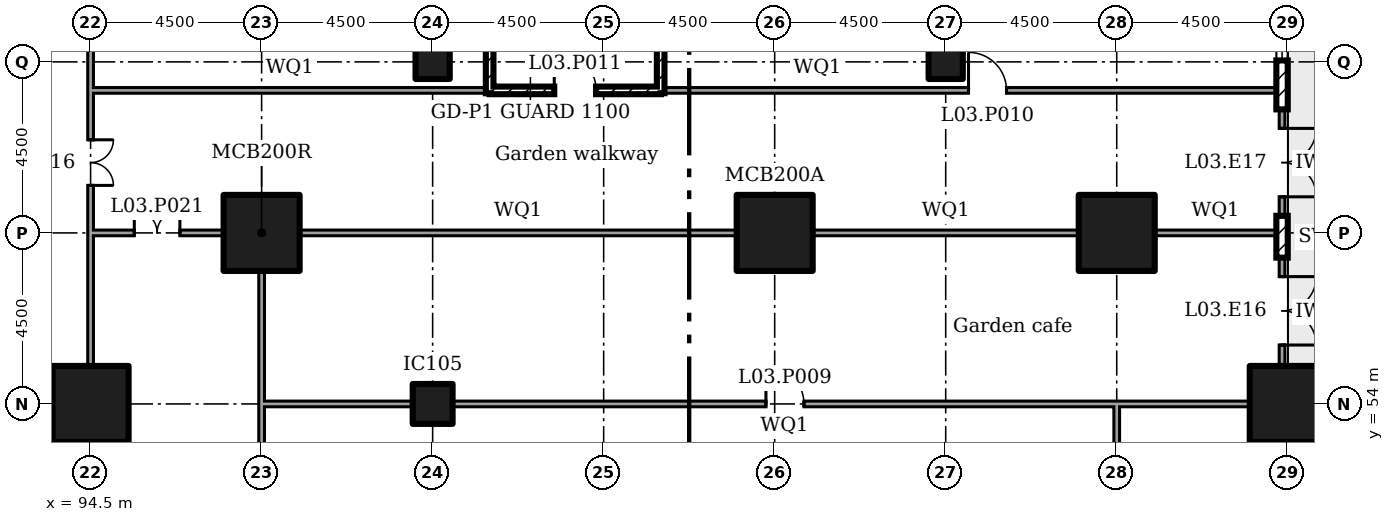
"""IFC4 building model, lengths in metres.
Left out: names, types, materials, properties, quantities, classifications, styles, units other than length and angle.
Written with IfcOpenShell. Run it as: python <this file> out.ifc"""

import sys

from ifc_helpers import new_model, si_unit, direction, frame, frame_2d, origin, origin_2d, place, context, subcontext, project, spatial, rectangle, extrude, element, fill, save


model = new_model("IFC4")
c1 = context("Model", 3, precision=1e-05, world=origin(), true_north=direction((0.0, 1.0)))
c2 = subcontext(c1, "Body", "Model", "MODEL_VIEW")
j1 = project(units=[si_unit("LENGTHUNIT", "METRE"), si_unit("PLANEANGLEUNIT", "RADIAN")], contexts=[c1])
p1 = place(None, origin())
s1 = spatial("IfcSite", under=j1, at=p1, CompositionType="ELEMENT")
p2 = place(p1, origin())
s2 = spatial("IfcBuilding", under=s1, at=p2, CompositionType="ELEMENT")
p3 = place(p2, frame((0.0, 0.0, 16.5)))
s3 = spatial("IfcBuildingStorey", under=s2, at=p3, CompositionType="ELEMENT", Elevation=16.5)
for number, where in (
    (1, (94.5, 54.0, 0.0)),
    (2, (99.0, 58.5, 0.0)),
    (3, (112.5, 58.5, 0.0)),
    (4, (121.5, 58.5, 0.0)),
    (5, (126.0, 54.0, 0.0)),
):
    element("IfcColumn", number, at=place(p3, frame(where)), inside=s3, PredefinedType="COLUMN", context=c2, shape_type="SweptSolid", body=[
        extrude(rectangle(XDim=2.0, YDim=2.0, at=origin_2d()), origin(), (0.0, 0.0, 1.0), 4.5),
    ])
p4 = place(p3, frame((103.5, 54.0, 0.0)))
e6 = element("IfcColumn", 6, at=p4, inside=s3, PredefinedType="COLUMN", context=c2, shape_type="SweptSolid", body=[
    extrude(rectangle(XDim=1.05, YDim=1.05, at=origin_2d()), origin(), (0.0, 0.0, 1.0), 4.5),
])
for number, where in (
    (7, (103.5, 63.0, 0.0)),
    (8, (117.0, 63.0, 0.0)),
):
    element("IfcColumn", number, at=place(p3, frame(where)), inside=s3, PredefinedType="COLUMN", context=c2, shape_type="SweptSolid", body=[
        extrude(rectangle(XDim=0.9, YDim=0.9, at=origin_2d()), origin(), (0.0, 0.0, 1.0), 4.5),
    ])
p5 = place(p3, frame((125.85, 55.0, 0.0), z_axis=(0.0, 0.0, 1.0), x_axis=(0.0, 1.0, 0.0)))
e9 = element("IfcWall", 9, at=p5, inside=s3, PredefinedType="SOLIDWALL", context=c2, shape_type="SweptSolid", body=[
    extrude(rectangle(XDim=2.85, YDim=0.15, at=frame_2d((1.425, 0.0))), origin(), (0.0, 0.0, 1.0), 4.05),
])
p6 = place(p5, frame((0.55, 0.0, 0.0)))
e10 = element("IfcOpeningElement", 10, at=p6, cuts=e9, PredefinedType="OPENING", context=c2, shape_type="SweptSolid", body=[
    extrude(rectangle(XDim=1.8, YDim=2.4, at=frame_2d((0.9, 1.2))), frame((0.0, 0.085, 0.0), z_axis=(0.0, -1.0, 0.0), x_axis=(1.0, 0.0, 0.0)), (0.0, 0.0, 1.0), 0.17),
])
p7 = place(p3, frame((125.85, 57.85, 0.0), z_axis=(0.0, 0.0, 1.0), x_axis=(0.0, 1.0, 0.0)))
e11 = element("IfcWall", 11, at=p7, inside=s3, PredefinedType="ELEMENTEDWALL", context=c2, shape_type="SweptSolid", body=[
    extrude(rectangle(XDim=1.1, YDim=0.3, at=frame_2d((0.55, 0.0))), origin(), (0.0, 0.0, 1.0), 4.05),
])
p8 = place(p3, frame((125.85, 58.95, 0.0), z_axis=(0.0, 0.0, 1.0), x_axis=(0.0, 1.0, 0.0)))
e12 = element("IfcWall", 12, at=p8, inside=s3, PredefinedType="SOLIDWALL", context=c2, shape_type="SweptSolid", body=[
    extrude(rectangle(XDim=2.8, YDim=0.15, at=frame_2d((1.4, 0.0))), origin(), (0.0, 0.0, 1.0), 4.05),
])
p9 = place(p8, frame((0.5, 0.0, 0.0)))
e13 = element("IfcOpeningElement", 13, at=p9, cuts=e12, PredefinedType="OPENING", context=c2, shape_type="SweptSolid", body=[
    extrude(rectangle(XDim=1.8, YDim=2.4, at=frame_2d((0.9, 1.2))), frame((0.0, 0.085, 0.0), z_axis=(0.0, -1.0, 0.0), x_axis=(1.0, 0.0, 0.0)), (0.0, 0.0, 1.0), 0.17),
])
p10 = place(p3, frame((125.85, 61.75, 0.0), z_axis=(0.0, 0.0, 1.0), x_axis=(0.0, 1.0, 0.0)))
e14 = element("IfcWall", 14, at=p10, inside=s3, PredefinedType="ELEMENTEDWALL", context=c2, shape_type="SweptSolid", body=[
    extrude(rectangle(XDim=4.975, YDim=0.3, at=frame_2d((2.488, 0.0))), origin(), (0.0, 0.0, 1.0), 4.05),
])
p11 = place(p10, frame((1.288, 0.0, 0.45)))
e15 = element("IfcOpeningElement", 15, at=p11, cuts=e14, PredefinedType="OPENING", context=c2, shape_type="SweptSolid", body=[
    extrude(rectangle(XDim=2.4, YDim=2.4, at=frame_2d((1.2, 1.2))), frame((0.0, 0.16, 0.0), z_axis=(0.0, -1.0, 0.0), x_axis=(1.0, 0.0, 0.0)), (0.0, 0.0, 1.0), 0.32),
])
p12 = place(p3, frame((94.5, 45.995, 0.0), z_axis=(0.0, 0.0, 1.0), x_axis=(0.0, 1.0, 0.0)))
e16 = element("IfcWall", 16, at=p12, inside=s3, PredefinedType="PARTITIONING", context=c2, shape_type="SweptSolid", body=[
    extrude(rectangle(XDim=7.01, YDim=0.15, at=frame_2d((3.505, 0.0))), origin(), (0.0, 0.0, 1.0), 2.25),
])
p13 = place(p12, frame((2.6, 0.0, 0.0)))
e17 = element("IfcOpeningElement", 17, at=p13, cuts=e16, PredefinedType="OPENING", context=c2, shape_type="SweptSolid", body=[
    extrude(rectangle(XDim=1.8, YDim=2.1, at=frame_2d((0.9, 1.05))), frame((0.0, 0.085, 0.0), z_axis=(0.0, -1.0, 0.0), x_axis=(1.0, 0.0, 0.0)), (0.0, 0.0, 1.0), 0.17),
])
p14 = place(p3, frame((94.5, 54.995, 0.0), z_axis=(0.0, 0.0, 1.0), x_axis=(0.0, 1.0, 0.0)))
e18 = element("IfcWall", 18, at=p14, inside=s3, PredefinedType="PARTITIONING", context=c2, shape_type="SweptSolid", body=[
    extrude(rectangle(XDim=3.58, YDim=0.15, at=frame_2d((1.79, 0.0))), origin(), (0.0, 0.0, 1.0), 4.05),
])
p15 = place(p3, frame((94.5, 58.5, 0.0), z_axis=(0.0, 0.0, 1.0), x_axis=(0.0, 1.0, 0.0)))
e19 = element("IfcWall", 19, at=p15, inside=s3, PredefinedType="PARTITIONING", context=c2, shape_type="SweptSolid", body=[
    extrude(rectangle(XDim=3.825, YDim=0.15, at=frame_2d((1.913, 0.0))), origin(), (0.0, 0.0, 1.0), 4.05),
])
p16 = place(p15, frame((1.25, 0.0, 0.0)))
e20 = element("IfcOpeningElement", 20, at=p16, cuts=e19, PredefinedType="OPENING", context=c2, shape_type="SweptSolid", body=[
    extrude(rectangle(XDim=1.2, YDim=2.1, at=frame_2d((0.6, 1.05))), frame((0.0, 0.085, 0.0), z_axis=(0.0, -1.0, 0.0), x_axis=(1.0, 0.0, 0.0)), (0.0, 0.0, 1.0), 0.17),
])
p17 = place(p3, frame((94.5, 62.25, 0.0), z_axis=(0.0, 0.0, 1.0), x_axis=(0.0, 1.0, 0.0)))
e21 = element("IfcWall", 21, at=p17, inside=s3, PredefinedType="PARTITIONING", context=c2, shape_type="SweptSolid", body=[
    extrude(rectangle(XDim=9.45, YDim=0.15, at=frame_2d((4.725, 0.0))), origin(), (0.0, 0.0, 1.0), 4.05),
])
p18 = place(p3, frame((99.0, 36.52, 0.0), z_axis=(0.0, 0.0, 1.0), x_axis=(0.0, 1.0, 0.0)))
e22 = element("IfcWall", 22, at=p18, inside=s3, PredefinedType="PARTITIONING", context=c2, shape_type="SweptSolid", body=[
    extrude(rectangle(XDim=17.555, YDim=0.15, at=frame_2d((8.777, 0.0))), origin(), (0.0, 0.0, 1.0), 4.05),
])
p19 = place(p18, frame((7.85, 0.0, 0.0)))
e23 = element("IfcOpeningElement", 23, at=p19, cuts=e22, PredefinedType="OPENING", context=c2, shape_type="SweptSolid", body=[
    extrude(rectangle(XDim=1.8, YDim=2.1, at=frame_2d((0.9, 1.05))), frame((0.0, 0.085, 0.0), z_axis=(0.0, -1.0, 0.0), x_axis=(1.0, 0.0, 0.0)), (0.0, 0.0, 1.0), 0.17),
])
p20 = place(p3, frame((99.0, 54.0, 0.0), z_axis=(0.0, 0.0, 1.0), x_axis=(0.0, 1.0, 0.0)))
e24 = element("IfcWall", 24, at=p20, inside=s3, PredefinedType="PARTITIONING", context=c2, shape_type="SweptSolid", body=[
    extrude(rectangle(XDim=3.505, YDim=0.15, at=frame_2d((1.752, 0.0))), origin(), (0.0, 0.0, 1.0), 4.05),
])
p21 = place(p3, frame((94.575, 58.5, 0.0)))
e25 = element("IfcWall", 25, at=p21, inside=s3, PredefinedType="PARTITIONING", context=c2, shape_type="SweptSolid", body=[
    extrude(rectangle(XDim=3.43, YDim=0.15, at=frame_2d((1.715, 0.0))), origin(), (0.0, 0.0, 1.0), 4.05),
])
p22 = place(p21, frame((1.075, 0.0, 0.0)))
e26 = element("IfcOpeningElement", 26, at=p22, cuts=e25, PredefinedType="OPENING", context=c2, shape_type="SweptSolid", body=[
    extrude(rectangle(XDim=1.2, YDim=2.1, at=frame_2d((0.6, 1.05))), frame((0.0, 0.085, 0.0), z_axis=(0.0, -1.0, 0.0), x_axis=(1.0, 0.0, 0.0)), (0.0, 0.0, 1.0), 0.17),
])
p23 = place(p3, frame((121.5, 50.02, 0.0), z_axis=(0.0, 0.0, 1.0), x_axis=(0.0, 1.0, 0.0)))
e27 = element("IfcWall", 27, at=p23, inside=s3, PredefinedType="PARTITIONING", context=c2, shape_type="SweptSolid", body=[
    extrude(rectangle(XDim=4.055, YDim=0.15, at=frame_2d((2.027, 0.0))), origin(), (0.0, 0.0, 1.0), 4.05),
])
p24 = place(p3, frame((99.075, 54.0, 0.0)))
e28 = element("IfcWall", 28, at=p24, inside=s3, PredefinedType="PARTITIONING", context=c2, shape_type="SweptSolid", body=[
    extrude(rectangle(XDim=3.905, YDim=0.15, at=frame_2d((1.953, 0.0))), origin(), (0.0, 0.0, 1.0), 4.05),
])
p25 = place(p3, frame((104.02, 54.0, 0.0)))
e29 = element("IfcWall", 29, at=p25, inside=s3, PredefinedType="PARTITIONING", context=c2, shape_type="SweptSolid", body=[
    extrude(rectangle(XDim=17.48, YDim=0.15, at=frame_2d((8.74, 0.0))), origin(), (0.0, 0.0, 1.0), 4.05),
])
p26 = place(p25, frame((8.25, 0.0, 0.0)))
e30 = element("IfcOpeningElement", 30, at=p26, cuts=e29, PredefinedType="OPENING", context=c2, shape_type="SweptSolid", body=[
    extrude(rectangle(XDim=1.0, YDim=2.1, at=frame_2d((0.5, 1.05))), frame((0.0, 0.085, 0.0), z_axis=(0.0, -1.0, 0.0), x_axis=(1.0, 0.0, 0.0)), (0.0, 0.0, 1.0), 0.17),
])
p27 = place(p3, frame((121.575, 54.0, 0.0)))
e31 = element("IfcWall", 31, at=p27, inside=s3, PredefinedType="PARTITIONING", context=c2, shape_type="SweptSolid", body=[
    extrude(rectangle(XDim=3.43, YDim=0.15, at=frame_2d((1.715, 0.0))), origin(), (0.0, 0.0, 1.0), 4.05),
])
p28 = place(p3, frame((99.995, 58.5, 0.0)))
e32 = element("IfcWall", 32, at=p28, inside=s3, PredefinedType="PARTITIONING", context=c2, shape_type="SweptSolid", body=[
    extrude(rectangle(XDim=11.51, YDim=0.15, at=frame_2d((5.755, 0.0))), origin(), (0.0, 0.0, 1.0), 2.25),
])
p29 = place(p3, frame((113.495, 58.5, 0.0)))
e33 = element("IfcWall", 33, at=p29, inside=s3, PredefinedType="PARTITIONING", context=c2, shape_type="SweptSolid", body=[
    extrude(rectangle(XDim=7.01, YDim=0.15, at=frame_2d((3.505, 0.0))), origin(), (0.0, 0.0, 1.0), 2.25),
])
p30 = place(p3, frame((122.495, 58.5, 0.0)))
e34 = element("IfcWall", 34, at=p30, inside=s3, PredefinedType="PARTITIONING", context=c2, shape_type="SweptSolid", body=[
    extrude(rectangle(XDim=3.205, YDim=0.15, at=frame_2d((1.603, 0.0))), origin(), (0.0, 0.0, 1.0), 4.05),
])
p31 = place(p3, frame((94.575, 62.25, 0.0)))
e35 = element("IfcWall", 35, at=p31, inside=s3, PredefinedType="PARTITIONING", context=c2, shape_type="SweptSolid", body=[
    extrude(rectangle(XDim=10.325, YDim=0.15, at=frame_2d((5.163, 0.0))), origin(), (0.0, 0.0, 1.0), 4.05),
])
p32 = place(p3, frame((109.6, 62.25, 0.0)))
e36 = element("IfcWall", 36, at=p32, inside=s3, PredefinedType="PARTITIONING", context=c2, shape_type="SweptSolid", body=[
    extrude(rectangle(XDim=16.1, YDim=0.15, at=frame_2d((8.05, 0.0))), origin(), (0.0, 0.0, 1.0), 4.05),
])
p33 = place(p32, frame((8.0, 0.0, 0.0)))
e37 = element("IfcOpeningElement", 37, at=p33, cuts=e36, PredefinedType="OPENING", context=c2, shape_type="SweptSolid", body=[
    extrude(rectangle(XDim=1.0, YDim=2.1, at=frame_2d((0.5, 1.05))), frame((0.0, 0.085, 0.0), z_axis=(0.0, -1.0, 0.0), x_axis=(1.0, 0.0, 0.0)), (0.0, 0.0, 1.0), 0.17),
])
p34 = place(p3, frame((105.0, 62.25, 0.0)))
e38 = element("IfcWall", 38, at=p34, inside=s3, PredefinedType="SOLIDWALL", context=c2, shape_type="SweptSolid", body=[
    extrude(rectangle(XDim=4.5, YDim=0.2, at=frame_2d((2.25, 0.0))), origin(), (0.0, 0.0, 1.0), 4.05),
])
p35 = place(p34, frame((1.7, 0.0, 0.0)))
e39 = element("IfcOpeningElement", 39, at=p35, cuts=e38, PredefinedType="OPENING", context=c2, shape_type="SweptSolid", body=[
    extrude(rectangle(XDim=1.1, YDim=2.1, at=frame_2d((0.55, 1.05))), frame((0.0, 0.11, 0.0), z_axis=(0.0, -1.0, 0.0), x_axis=(1.0, 0.0, 0.0)), (0.0, 0.0, 1.0), 0.22),
])
for number, where, z_axis, x_axis in (
    (40, (105.0, 62.175, 0.0), (0.0, 0.0, 1.0), (0.0, 1.0, 0.0)),
    (41, (109.5, 62.175, 0.0), (0.0, 0.0, 1.0), (0.0, 1.0, 0.0)),
):
    element("IfcWall", number, at=place(p3, frame(where, z_axis=z_axis, x_axis=x_axis)), inside=s3, PredefinedType="SOLIDWALL", context=c2, shape_type="SweptSolid", body=[
        extrude(rectangle(XDim=8.725, YDim=0.2, at=frame_2d((4.362, 0.0))), origin(), (0.0, 0.0, 1.0), 4.05),
    ])
p36 = place(p6, frame((1.8, 0.0, 0.0), x_axis=(-1.0, 0.0, 0.0)))
e42 = element("IfcDoor", 42, at=p36, inside=s3, OperationType="DOUBLE_DOOR_DOUBLE_SWING", PredefinedType="NOTDEFINED", context=c2, shape_type="SweptSolid", body=[
    extrude(rectangle(XDim=1.8, YDim=2.4, at=frame_2d((0.9, 1.2))), frame((0.0, 0.025, 0.0), z_axis=(0.0, -1.0, 0.0), x_axis=(1.0, 0.0, 0.0)), (0.0, 0.0, 1.0), 0.05),
])
fill(e10, e42)
p37 = place(p9, frame((1.8, 0.0, 0.0), x_axis=(-1.0, 0.0, 0.0)))
e43 = element("IfcDoor", 43, at=p37, inside=s3, OperationType="DOUBLE_DOOR_DOUBLE_SWING", PredefinedType="NOTDEFINED", context=c2, shape_type="SweptSolid", body=[
    extrude(rectangle(XDim=1.8, YDim=2.4, at=frame_2d((0.9, 1.2))), frame((0.0, 0.025, 0.0), z_axis=(0.0, -1.0, 0.0), x_axis=(1.0, 0.0, 0.0)), (0.0, 0.0, 1.0), 0.05),
])
fill(e13, e43)
p38 = place(p11, origin())
e44 = element("IfcWindow", 44, at=p38, inside=s3, PartitioningType="SINGLE_PANEL", PredefinedType="WINDOW", context=c2, shape_type="SweptSolid", body=[
    extrude(rectangle(XDim=2.4, YDim=2.4, at=frame_2d((1.2, 1.2))), frame((0.0, 0.03, 0.0), z_axis=(0.0, -1.0, 0.0), x_axis=(1.0, 0.0, 0.0)), (0.0, 0.0, 1.0), 0.06),
])
fill(e15, e44)
p39 = place(p26, origin())
e45 = element("IfcDoor", 45, at=p39, inside=s3, OperationType="SINGLE_SWING_RIGHT", PredefinedType="DOOR", context=c2, shape_type="SweptSolid", body=[
    extrude(rectangle(XDim=1.0, YDim=2.1, at=frame_2d((0.5, 1.05))), frame((0.0, 0.025, 0.0), z_axis=(0.0, -1.0, 0.0), x_axis=(1.0, 0.0, 0.0)), (0.0, 0.0, 1.0), 0.05),
])
fill(e30, e45)
p40 = place(p33, origin())
e46 = element("IfcDoor", 46, at=p40, inside=s3, OperationType="SINGLE_SWING_RIGHT", PredefinedType="DOOR", context=c2, shape_type="SweptSolid", body=[
    extrude(rectangle(XDim=1.0, YDim=2.1, at=frame_2d((0.5, 1.05))), frame((0.0, 0.025, 0.0), z_axis=(0.0, -1.0, 0.0), x_axis=(1.0, 0.0, 0.0)), (0.0, 0.0, 1.0), 0.05),
])
fill(e37, e46)
p41 = place(p35, origin())
e47 = element("IfcDoor", 47, at=p41, inside=s3, OperationType="SINGLE_SWING_RIGHT", PredefinedType="DOOR", context=c2, shape_type="SweptSolid", body=[
    extrude(rectangle(XDim=1.1, YDim=2.1, at=frame_2d((0.55, 1.05))), frame((0.0, 0.025, 0.0), z_axis=(0.0, -1.0, 0.0), x_axis=(1.0, 0.0, 0.0)), (0.0, 0.0, 1.0), 0.05),
])
fill(e39, e47)
p42 = place(p16, frame((1.2, 0.0, 0.0), x_axis=(-1.0, 0.0, 0.0)))
e48 = element("IfcDoor", 48, at=p42, inside=s3, OperationType="DOUBLE_DOOR_SINGLE_SWING", PredefinedType="DOOR", context=c2, shape_type="SweptSolid", body=[
    extrude(rectangle(XDim=1.2, YDim=2.1, at=frame_2d((0.6, 1.05))), frame((0.0, 0.025, 0.0), z_axis=(0.0, -1.0, 0.0), x_axis=(1.0, 0.0, 0.0)), (0.0, 0.0, 1.0), 0.05),
])
fill(e20, e48)
p43 = place(p22, origin())
e49 = element("IfcDoor", 49, at=p43, inside=s3, OperationType="DOUBLE_DOOR_SINGLE_SWING", PredefinedType="DOOR", context=c2, shape_type="SweptSolid", body=[
    extrude(rectangle(XDim=1.2, YDim=2.1, at=frame_2d((0.6, 1.05))), frame((0.0, 0.025, 0.0), z_axis=(0.0, -1.0, 0.0), x_axis=(1.0, 0.0, 0.0)), (0.0, 0.0, 1.0), 0.05),
])
fill(e26, e49)
save(model, sys.argv[1])
